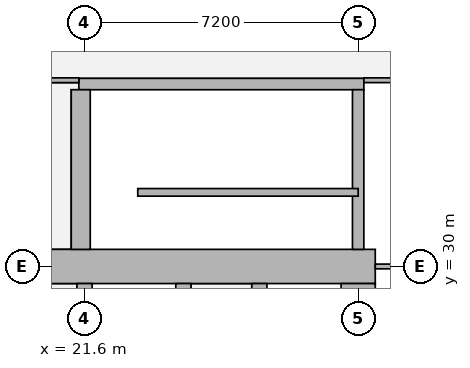
"""IFC4 building model, lengths in metres.
Left out: names, types, materials, properties, quantities, classifications, styles, units other than length and angle.
Written with IfcOpenShell. Run it as: python <this file> out.ifc"""

import sys

from ifc_helpers import new_model, si_unit, direction, frame, frame_2d, origin, place, context, subcontext, project, spatial, rectangle, extrude, element, fill, save


model = new_model("IFC4")
c1 = context("Model", 3, precision=1e-05, world=origin(), true_north=direction((0.0, 1.0)))
c2 = subcontext(c1, "Body", "Model", "MODEL_VIEW")
j1 = project(units=[si_unit("LENGTHUNIT", "METRE"), si_unit("PLANEANGLEUNIT", "RADIAN")], contexts=[c1])
p1 = place(None, origin())
s1 = spatial("IfcSite", under=j1, at=p1, CompositionType="ELEMENT")
p2 = place(p1, origin())
s2 = spatial("IfcBuilding", under=s1, at=p2, CompositionType="ELEMENT")
p3 = place(p2, frame((0.0, 0.0, 31.25)))
s3 = spatial("IfcBuildingStorey", under=s2, at=p3, CompositionType="ELEMENT", Elevation=31.25)
p4 = place(p3, frame((13.95, 30.0, 0.0), z_axis=(0.0, 0.0, 1.0), x_axis=(1.0, 0.0, 0.0)))
e1 = element("IfcWall", 1, at=p4, inside=s3, PredefinedType="SHEAR", context=c2, shape_type="SweptSolid", body=[
    extrude(rectangle(XDim=15.3, YDim=0.9, at=frame_2d((7.65, 0.0))), origin(), (0.0, 0.0, 1.0), 3.75),
])
p5 = place(p4, frame((4.45, 0.0, 0.0)))
e2 = element("IfcOpeningElement", 2, at=p5, cuts=e1, PredefinedType="OPENING", context=c2, shape_type="SweptSolid", body=[
    extrude(rectangle(XDim=1.8, YDim=2.1, at=frame_2d((0.9, 1.05))), frame((0.0, 0.46, 0.0), z_axis=(0.0, -1.0, 0.0), x_axis=(1.0, 0.0, 0.0)), (0.0, 0.0, 1.0), 0.92),
])
p6 = place(p4, frame((10.7, 0.0, 0.0)))
e3 = element("IfcOpeningElement", 3, at=p6, cuts=e1, PredefinedType="OPENING", context=c2, shape_type="SweptSolid", body=[
    extrude(rectangle(XDim=1.1, YDim=2.1, at=frame_2d((0.55, 1.05))), frame((0.0, 0.46, 0.0), z_axis=(0.0, -1.0, 0.0), x_axis=(1.0, 0.0, 0.0)), (0.0, 0.0, 1.0), 0.92),
])
p7 = place(p3, frame((28.8, 15.45, 0.0), z_axis=(0.0, 0.0, 1.0), x_axis=(0.0, 1.0, 0.0)))
e4 = element("IfcWall", 4, at=p7, inside=s3, PredefinedType="SHEAR", context=c2, shape_type="SweptSolid", body=[
    extrude(rectangle(XDim=14.1, YDim=0.9, at=frame_2d((7.05, 0.0))), origin(), (0.0, 0.0, 1.0), 3.75),
])
for number, where, z_axis, x_axis in (
    (5, (21.6, 15.45, 0.0), (0.0, 0.0, 1.0), (0.0, 1.0, 0.0)),
    (6, (24.2, 15.45, 0.0), (0.0, 0.0, 1.0), (0.0, 1.0, 0.0)),
):
    element("IfcWall", number, at=place(p3, frame(where, z_axis=z_axis, x_axis=x_axis)), inside=s3, PredefinedType="SHEAR", context=c2, shape_type="SweptSolid", body=[
        extrude(rectangle(XDim=14.1, YDim=0.4, at=frame_2d((7.05, 0.0))), origin(), (0.0, 0.0, 1.0), 3.75),
    ])
p8 = place(p3, frame((26.2, 26.45, 0.0), z_axis=(0.0, 0.0, 1.0), x_axis=(0.0, 1.0, 0.0)))
e7 = element("IfcWall", 7, at=p8, inside=s3, PredefinedType="SHEAR", context=c2, shape_type="SweptSolid", body=[
    extrude(rectangle(XDim=3.1, YDim=0.4, at=frame_2d((1.55, 0.0))), origin(), (0.0, 0.0, 1.0), 3.75),
])
p9 = place(p8, frame((1.075, 0.0, 0.0)))
e8 = element("IfcOpeningElement", 8, at=p9, cuts=e7, PredefinedType="OPENING", context=c2, shape_type="SweptSolid", body=[
    extrude(rectangle(XDim=1.2, YDim=2.1, at=frame_2d((0.6, 1.05))), frame((0.0, 0.21, 0.0), z_axis=(0.0, -1.0, 0.0), x_axis=(1.0, 0.0, 0.0)), (0.0, 0.0, 1.0), 0.42),
])
p10 = place(p3, frame((21.45, 34.8, 0.0), z_axis=(0.0, 0.0, 1.0), x_axis=(1.0, 0.0, 0.0)))
e9 = element("IfcWall", 9, at=p10, inside=s3, PredefinedType="SHEAR", context=c2, shape_type="SweptSolid", body=[
    extrude(rectangle(XDim=7.5, YDim=0.3, at=frame_2d((3.75, 0.0))), origin(), (0.0, 0.0, 1.0), 3.75),
])
p11 = place(p10, frame((0.5, 0.0, 0.0)))
e10 = element("IfcOpeningElement", 10, at=p11, cuts=e9, PredefinedType="OPENING", context=c2, shape_type="SweptSolid", body=[
    extrude(rectangle(XDim=1.1, YDim=2.1, at=frame_2d((0.55, 1.05))), frame((0.0, 0.16, 0.0), z_axis=(0.0, -1.0, 0.0), x_axis=(1.0, 0.0, 0.0)), (0.0, 0.0, 1.0), 0.32),
])
p12 = place(p3, frame((21.5, 30.45, 0.0), z_axis=(0.0, 0.0, 1.0), x_axis=(0.0, 1.0, 0.0)))
e11 = element("IfcWall", 11, at=p12, inside=s3, PredefinedType="SHEAR", context=c2, shape_type="SweptSolid", body=[
    extrude(rectangle(XDim=4.2, YDim=0.5, at=frame_2d((2.1, 0.0))), origin(), (0.0, 0.0, 1.0), 3.75),
])
p13 = place(p3, frame((28.8, 30.45, 0.0), z_axis=(0.0, 0.0, 1.0), x_axis=(0.0, 1.0, 0.0)))
e12 = element("IfcWall", 12, at=p13, inside=s3, PredefinedType="SHEAR", context=c2, shape_type="SweptSolid", body=[
    extrude(rectangle(XDim=4.2, YDim=0.3, at=frame_2d((2.1, 0.0))), origin(), (0.0, 0.0, 1.0), 3.75),
])
p14 = place(p3, frame((10.163, 34.9, 0.0), z_axis=(0.0, 0.0, 1.0), x_axis=(1.0, 0.0, 0.0)))
e13 = element("IfcWall", 13, at=p14, inside=s3, PredefinedType="PARTITIONING", context=c2, shape_type="SweptSolid", body=[
    extrude(rectangle(XDim=11.287, YDim=0.125, at=frame_2d((5.644, 0.0))), origin(), (0.0, 0.0, 1.0), 3.5),
])
p15 = place(p14, frame((7.737, 0.0, 0.0)))
e14 = element("IfcOpeningElement", 14, at=p15, cuts=e13, PredefinedType="OPENING", context=c2, shape_type="SweptSolid", body=[
    extrude(rectangle(XDim=1.8, YDim=2.1, at=frame_2d((0.9, 1.05))), frame((0.0, 0.073, 0.0), z_axis=(0.0, -1.0, 0.0), x_axis=(1.0, 0.0, 0.0)), (0.0, 0.0, 1.0), 0.145),
])
p16 = place(p3, frame((28.95, 34.9, 0.0), z_axis=(0.0, 0.0, 1.0), x_axis=(1.0, 0.0, 0.0)))
e15 = element("IfcWall", 15, at=p16, inside=s3, PredefinedType="PARTITIONING", context=c2, shape_type="SweptSolid", body=[
    extrude(rectangle(XDim=4.588, YDim=0.125, at=frame_2d((2.294, 0.0))), origin(), (0.0, 0.0, 1.0), 3.5),
])
p17 = place(p3, frame((29.25, 30.0, 0.0), z_axis=(0.0, 0.0, 1.0), x_axis=(1.0, 0.0, 0.0)))
e16 = element("IfcWall", 16, at=p17, inside=s3, PredefinedType="PARTITIONING", context=c2, shape_type="SweptSolid", body=[
    extrude(rectangle(XDim=2.849, YDim=0.125, at=frame_2d((1.425, 0.0))), origin(), (0.0, 0.0, 1.0), 3.5),
])
p18 = place(p3, frame((23.0, 31.95, 0.0), z_axis=(0.0, 0.0, 1.0), x_axis=(1.0, 0.0, 0.0)))
e17 = element("IfcWall", 17, at=p18, inside=s3, PredefinedType="SHEAR", context=c2, shape_type="SweptSolid", body=[
    extrude(rectangle(XDim=5.8, YDim=0.2, at=frame_2d((2.9, 0.0))), origin(), (0.0, 0.0, 1.0), 3.75),
])
p19 = place(p6, origin())
e18 = element("IfcDoor", 18, at=p19, inside=s3, OperationType="SINGLE_SWING_RIGHT", PredefinedType="DOOR", context=c2, shape_type="SweptSolid", body=[
    extrude(rectangle(XDim=1.1, YDim=2.1, at=frame_2d((0.55, 1.05))), frame((0.0, 0.025, 0.0), z_axis=(0.0, -1.0, 0.0), x_axis=(1.0, 0.0, 0.0)), (0.0, 0.0, 1.0), 0.05),
])
fill(e3, e18)
p20 = place(p11, origin())
e19 = element("IfcDoor", 19, at=p20, inside=s3, OperationType="SINGLE_SWING_RIGHT", PredefinedType="DOOR", context=c2, shape_type="SweptSolid", body=[
    extrude(rectangle(XDim=1.1, YDim=2.1, at=frame_2d((0.55, 1.05))), frame((0.0, 0.025, 0.0), z_axis=(0.0, -1.0, 0.0), x_axis=(1.0, 0.0, 0.0)), (0.0, 0.0, 1.0), 0.05),
])
fill(e10, e19)
save(model, sys.argv[1])
